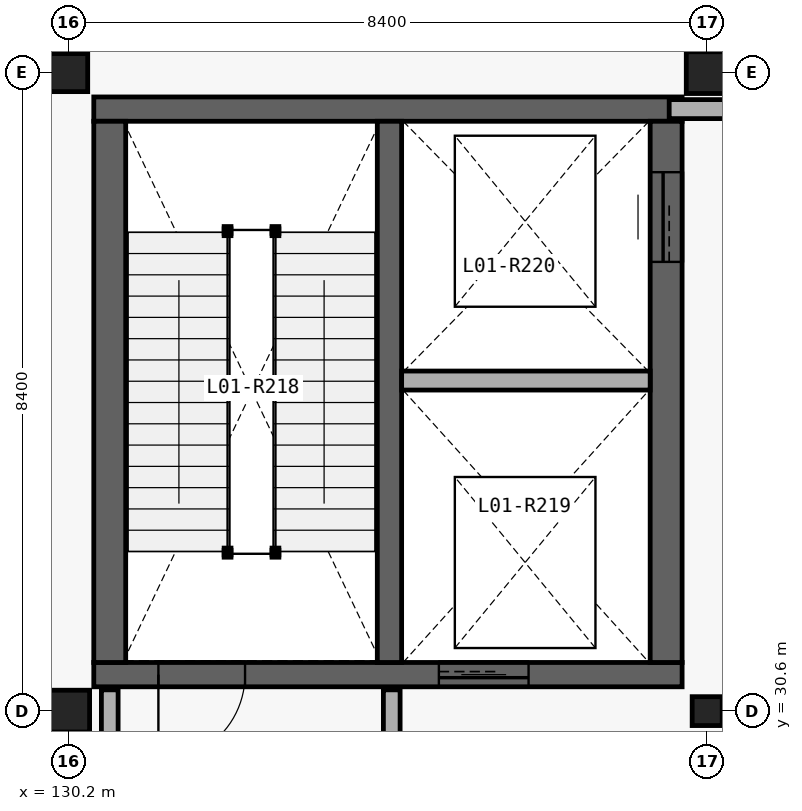
"""IFC4 building model, lengths in metres.
Left out: names, types, materials, properties, quantities, classifications, styles, units other than length and angle.
Written with IfcOpenShell. Run it as: python <this file> out.ifc"""

import sys

from ifc_helpers import new_model, si_unit, direction, frame, frame_2d, origin_with_axes, origin_2d_with_axis, place, context, subcontext, project, spatial, rectangle, i_section, extrude, element, fill, save


model = new_model("IFC4")
c1 = context("Model", 3, precision=1e-05, world=origin_with_axes(), true_north=direction((0.0, 1.0)))
c2 = subcontext(c1, "Body", "Model", "MODEL_VIEW")
j1 = project(units=[si_unit("LENGTHUNIT", "METRE"), si_unit("PLANEANGLEUNIT", "RADIAN")], contexts=[c1])
p1 = place(None, origin_with_axes())
s1 = spatial("IfcSite", under=j1, at=p1, CompositionType="ELEMENT")
p2 = place(p1, origin_with_axes())
s2 = spatial("IfcBuilding", under=s1, at=p2, CompositionType="ELEMENT")
p3 = place(p2, frame((0.0, 0.0, 5.4), z_axis=(0.0, 0.0, 1.0), x_axis=(1.0, 0.0, 0.0)))
s3 = spatial("IfcBuildingStorey", under=s2, at=p3, CompositionType="ELEMENT", Elevation=5.4)
p4 = place(None, frame((130.53, 31.08, 5.4), z_axis=(0.0, 0.0, 1.0), x_axis=(1.0, 0.0, 0.0)))
e1 = element("IfcWall", 1, at=p4, inside=s3, PredefinedType="SHEAR", context=c2, shape_type="SweptSolid", body=[
    extrude(rectangle(XDim=7.74, YDim=0.32, at=frame_2d((3.87, 0.0), x_axis=(1.0, 0.0))), origin_with_axes(), (0.0, 0.0, 1.0), 5.4),
])
p5 = place(None, frame((131.95, 31.08, 5.4), z_axis=(0.0, 0.0, 1.0), x_axis=(1.0, 0.0, 0.0)))
e2 = element("IfcOpeningElement", 2, at=p5, cuts=e1, PredefinedType="OPENING", context=c2, shape_type="SweptSolid", body=[
    extrude(rectangle(XDim=1.14, YDim=2.18, at=frame_2d((0.0, 1.09), x_axis=(1.0, 0.0))), frame((0.0, 0.17, 0.0), z_axis=(0.0, -1.0, 0.0), x_axis=(1.0, 0.0, 0.0)), (0.0, 0.0, 1.0), 0.34),
])
p6 = place(None, frame((135.66, 31.08, 5.4), z_axis=(0.0, 0.0, 1.0), x_axis=(1.0, 0.0, 0.0)))
e3 = element("IfcOpeningElement", 3, at=p6, cuts=e1, PredefinedType="OPENING", context=c2, shape_type="SweptSolid", body=[
    extrude(rectangle(XDim=1.18, YDim=2.24, at=frame_2d((0.0, 1.12), x_axis=(1.0, 0.0))), frame((0.0, 0.17, 0.0), z_axis=(0.0, -1.0, 0.0), x_axis=(1.0, 0.0, 0.0)), (0.0, 0.0, 1.0), 0.34),
])
p7 = place(None, frame((138.27, 38.52, 5.4), z_axis=(0.0, 0.0, 1.0), x_axis=(-1.0, 0.0, 0.0)))
e4 = element("IfcWall", 4, at=p7, inside=s3, PredefinedType="SHEAR", context=c2, shape_type="SweptSolid", body=[
    extrude(rectangle(XDim=7.74, YDim=0.32, at=frame_2d((3.87, 0.0), x_axis=(1.0, 0.0))), origin_with_axes(), (0.0, 0.0, 1.0), 5.4),
])
p8 = place(None, frame((138.06, 31.24, 5.4), z_axis=(0.0, 0.0, 1.0), x_axis=(0.0, 1.0, 0.0)))
e5 = element("IfcWall", 5, at=p8, inside=s3, PredefinedType="SHEAR", context=c2, shape_type="SweptSolid", body=[
    extrude(rectangle(XDim=7.12, YDim=0.42, at=frame_2d((3.56, 0.0), x_axis=(1.0, 0.0))), origin_with_axes(), (0.0, 0.0, 1.0), 5.4),
])
p9 = place(None, frame((138.06, 37.1, 5.4), z_axis=(0.0, 0.0, 1.0), x_axis=(0.0, 1.0, 0.0)))
e6 = element("IfcOpeningElement", 6, at=p9, cuts=e5, PredefinedType="OPENING", context=c2, shape_type="SweptSolid", body=[
    extrude(rectangle(XDim=1.18, YDim=2.24, at=frame_2d((0.0, 1.12), x_axis=(1.0, 0.0))), frame((0.0, 0.22, 0.0), z_axis=(0.0, -1.0, 0.0), x_axis=(1.0, 0.0, 0.0)), (0.0, 0.0, 1.0), 0.44),
])
p10 = place(None, frame((130.74, 38.36, 5.4), z_axis=(0.0, 0.0, 1.0), x_axis=(0.0, -1.0, 0.0)))
e7 = element("IfcWall", 7, at=p10, inside=s3, PredefinedType="SHEAR", context=c2, shape_type="SweptSolid", body=[
    extrude(rectangle(XDim=7.12, YDim=0.42, at=frame_2d((3.56, 0.0), x_axis=(1.0, 0.0))), origin_with_axes(), (0.0, 0.0, 1.0), 5.4),
])
p11 = place(None, frame((134.42, 31.24, 5.4), z_axis=(0.0, 0.0, 1.0), x_axis=(0.0, 1.0, 0.0)))
e8 = element("IfcWall", 8, at=p11, inside=s3, PredefinedType="SHEAR", context=c2, shape_type="SweptSolid", body=[
    extrude(rectangle(XDim=7.12, YDim=0.32, at=frame_2d((3.56, 0.0), x_axis=(1.0, 0.0))), origin_with_axes(), (0.0, 0.0, 1.0), 5.4),
])
p12 = place(None, frame((134.58, 34.949, 5.4), z_axis=(0.0, 0.0, 1.0), x_axis=(1.0, 0.0, 0.0)))
e9 = element("IfcWall", 9, at=p12, inside=s3, PredefinedType="PARTITIONING", context=c2, shape_type="SweptSolid", body=[
    extrude(rectangle(XDim=3.27, YDim=0.25, at=frame_2d((1.635, 0.0), x_axis=(1.0, 0.0))), origin_with_axes(), (0.0, 0.0, 1.0), 5.08),
])
p13 = place(None, frame((138.1, 38.52, 5.4), z_axis=(0.0, 0.0, 1.0), x_axis=(1.0, 0.0, 0.0)))
e10 = element("IfcWall", 10, at=p13, inside=s3, PredefinedType="PARTITIONING", context=c2, shape_type="SweptSolid", body=[
    extrude(rectangle(XDim=3.36, YDim=0.25, at=frame_2d((1.68, 0.0), x_axis=(1.0, 0.0))), origin_with_axes(), (0.0, 0.0, 1.0), 5.08),
])
for number, where, z_axis, x_axis in (
    (11, (130.74, 29.62, 5.4), (0.0, 0.0, 1.0), (0.0, 1.0, 0.0)),
    (12, (134.45, 29.62, 5.4), (0.0, 0.0, 1.0), (0.0, 1.0, 0.0)),
):
    element("IfcWall", number, at=place(None, frame(where, z_axis=z_axis, x_axis=x_axis)), inside=s3, PredefinedType="PARTITIONING", context=c2, shape_type="SweptSolid", body=[
        extrude(rectangle(XDim=1.26, YDim=0.22, at=frame_2d((0.63, 0.0), x_axis=(1.0, 0.0))), origin_with_axes(), (0.0, 0.0, 1.0), 5.08),
    ])
p14 = place(None, frame((130.2, 30.6, 5.4), z_axis=(0.0, 0.0, 1.0), x_axis=(1.0, 0.0, 0.0)))
e13 = element("IfcColumn", 13, at=p14, inside=s3, PredefinedType="COLUMN", context=c2, shape_type="SweptSolid", body=[
    extrude(i_section(OverallWidth=0.55, OverallDepth=0.55, WebThickness=0.025, FlangeThickness=0.042, at=origin_2d_with_axis()), origin_with_axes(), (0.0, 0.0, 1.0), 5.4),
])
p15 = place(None, frame((130.2, 39.0, 5.4), z_axis=(0.0, 0.0, 1.0), x_axis=(1.0, 0.0, 0.0)))
e14 = element("IfcColumn", 14, at=p15, inside=s3, PredefinedType="COLUMN", context=c2, shape_type="SweptSolid", body=[
    extrude(i_section(OverallWidth=0.5, OverallDepth=0.5, WebThickness=0.022, FlangeThickness=0.036, at=origin_2d_with_axis()), origin_with_axes(), (0.0, 0.0, 1.0), 5.4),
])
p16 = place(None, frame((138.6, 30.6, 5.4), z_axis=(0.0, 0.0, 1.0), x_axis=(1.0, 0.0, 0.0)))
e15 = element("IfcColumn", 15, at=p16, inside=s3, PredefinedType="COLUMN", context=c2, shape_type="SweptSolid", body=[
    extrude(i_section(OverallWidth=0.395, OverallDepth=0.38, WebThickness=0.019, FlangeThickness=0.03, at=origin_2d_with_axis()), origin_with_axes(), (0.0, 0.0, 1.0), 5.4),
])
p17 = place(None, frame((138.6, 39.0, 5.4), z_axis=(0.0, 0.0, 1.0), x_axis=(1.0, 0.0, 0.0)))
e16 = element("IfcColumn", 16, at=p17, inside=s3, PredefinedType="COLUMN", context=c2, shape_type="SweptSolid", body=[
    extrude(i_section(OverallWidth=0.55, OverallDepth=0.55, WebThickness=0.025, FlangeThickness=0.042, at=origin_2d_with_axis()), origin_with_axes(), (0.0, 0.0, 1.0), 5.4),
])
p18 = place(None, frame((131.95, 31.08, 5.4), z_axis=(0.0, 0.0, 1.0), x_axis=(-1.0, 0.0, 0.0)))
e17 = element("IfcDoor", 17, at=p18, inside=s3, OperationType="SINGLE_SWING_LEFT", PredefinedType="DOOR", context=c2, shape_type="SweptSolid", body=[
    extrude(rectangle(XDim=1.14, YDim=2.18, at=frame_2d((0.0, 1.09), x_axis=(1.0, 0.0))), frame((0.0, 0.04, 0.0), z_axis=(0.0, -1.0, 0.0), x_axis=(1.0, 0.0, 0.0)), (0.0, 0.0, 1.0), 0.08),
])
fill(e2, e17)
p19 = place(None, frame((135.66, 31.08, 5.4), z_axis=(0.0, 0.0, 1.0), x_axis=(-1.0, 0.0, 0.0)))
e18 = element("IfcDoor", 18, at=p19, inside=s3, OperationType="SLIDING_TO_LEFT", PredefinedType="DOOR", context=c2, shape_type="SweptSolid", body=[
    extrude(rectangle(XDim=1.18, YDim=2.24, at=frame_2d((0.0, 1.12), x_axis=(1.0, 0.0))), frame((0.0, 0.04, 0.0), z_axis=(0.0, -1.0, 0.0), x_axis=(1.0, 0.0, 0.0)), (0.0, 0.0, 1.0), 0.08),
])
fill(e3, e18)
p20 = place(None, frame((138.06, 37.1, 5.4), z_axis=(0.0, 0.0, 1.0), x_axis=(0.0, 1.0, 0.0)))
e19 = element("IfcDoor", 19, at=p20, inside=s3, OperationType="SLIDING_TO_LEFT", PredefinedType="DOOR", context=c2, shape_type="SweptSolid", body=[
    extrude(rectangle(XDim=1.18, YDim=2.24, at=frame_2d((0.0, 1.12), x_axis=(1.0, 0.0))), frame((0.0, 0.04, 0.0), z_axis=(0.0, -1.0, 0.0), x_axis=(1.0, 0.0, 0.0)), (0.0, 0.0, 1.0), 0.08),
])
fill(e6, e19)
save(model, sys.argv[1])
